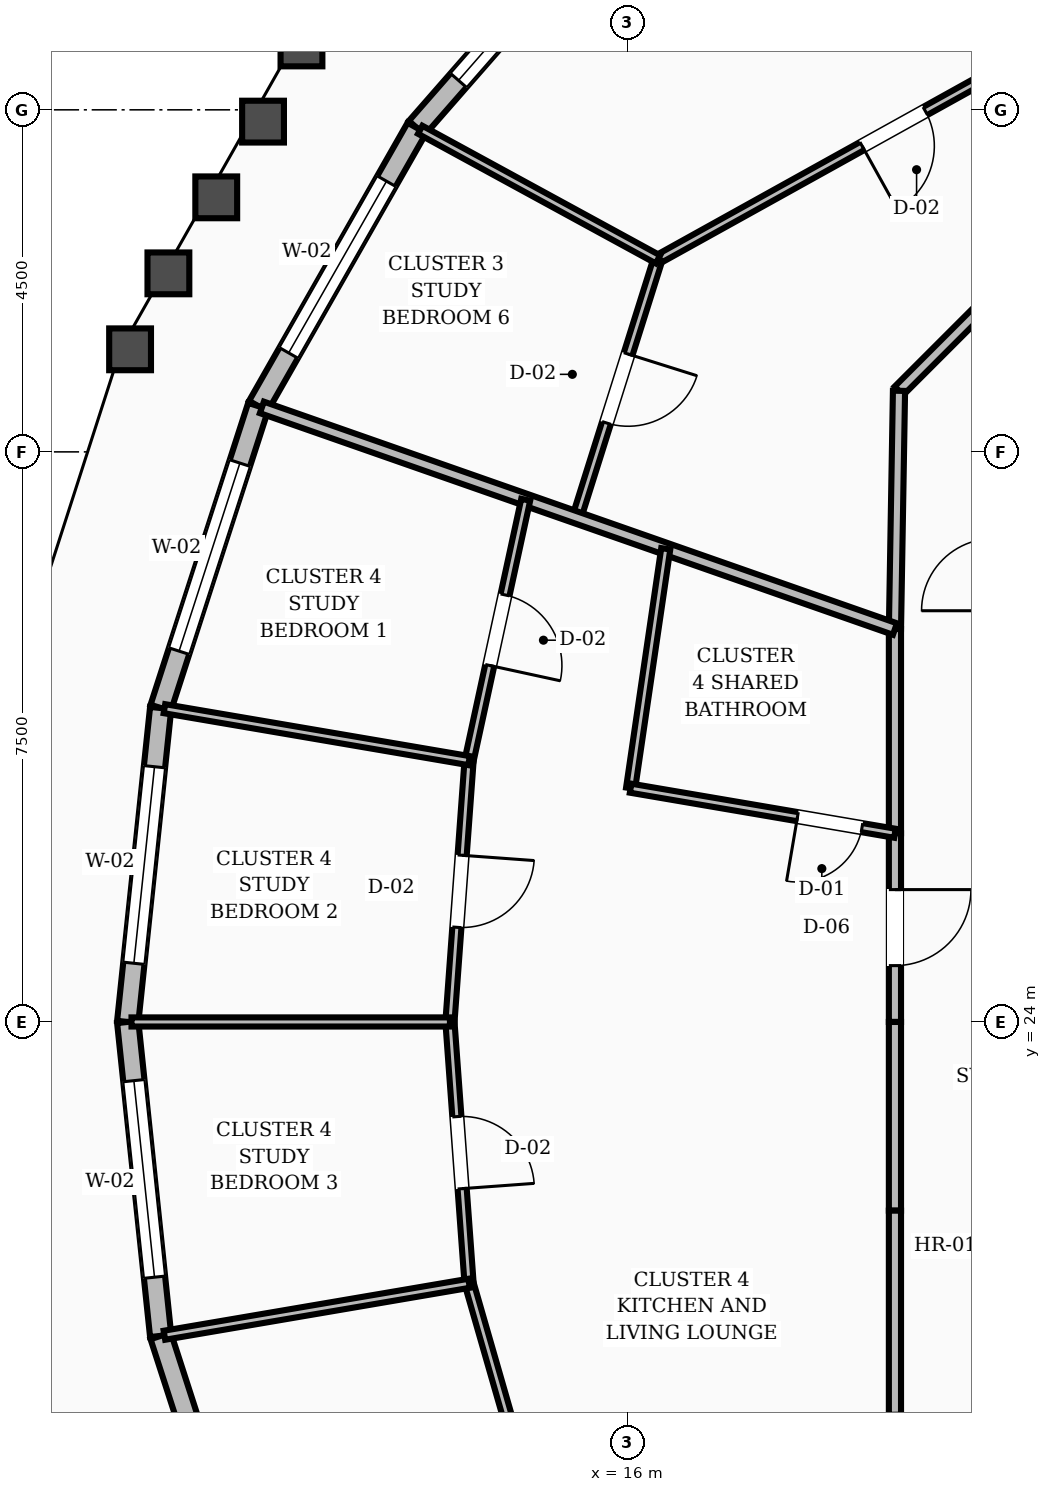
"""IFC4 building model, lengths in metres.
Left out: names, types, materials, properties, quantities, classifications, styles, units other than length and angle.
Written with IfcOpenShell. Run it as: python <this file> out.ifc"""

import sys

from ifc_helpers import new_model, si_unit, direction, frame, frame_2d, origin, place, context, subcontext, project, spatial, rectangle, extrude, element, fill, save


model = new_model("IFC4")
c1 = context("Model", 3, precision=1e-05, world=origin(), true_north=direction((0.0, 1.0)))
c2 = subcontext(c1, "Body", "Model", "MODEL_VIEW")
j1 = project(units=[si_unit("LENGTHUNIT", "METRE"), si_unit("PLANEANGLEUNIT", "RADIAN")], contexts=[c1])
p1 = place(None, origin())
s1 = spatial("IfcSite", under=j1, at=p1, CompositionType="ELEMENT")
p2 = place(p1, origin())
s2 = spatial("IfcBuilding", under=s1, at=p2, CompositionType="ELEMENT")
p3 = place(p2, frame((0.0, 0.0, 229.2)))
s3 = spatial("IfcBuildingStorey", under=s2, at=p3, CompositionType="ELEMENT", Elevation=229.2)
p4 = place(p3, frame((16.038, 38.97, 0.0), z_axis=(0.0, 0.0, 1.0), x_axis=(-0.65855326106, -0.752534120387, 0.0)))
e1 = element("IfcWall", 1, at=p4, inside=s3, PredefinedType="STANDARD", context=c2, shape_type="SweptSolid", body=[
    extrude(rectangle(XDim=4.263, YDim=0.28, at=frame_2d((2.131, 0.0))), origin(), (0.0, 0.0, 1.0), 2.88),
])
p5 = place(p4, frame((0.832, 0.0, 0.8)))
e2 = element("IfcOpeningElement", 2, at=p5, cuts=e1, PredefinedType="OPENING", context=c2, shape_type="SweptSolid", body=[
    extrude(rectangle(XDim=2.6, YDim=1.65, at=frame_2d((1.3, 0.825))), frame((0.0, 0.15, 0.0), z_axis=(0.0, -1.0, 0.0), x_axis=(1.0, 0.0, 0.0)), (0.0, 0.0, 1.0), 0.3),
])
p6 = place(p3, frame((13.23, 35.762, 0.0), z_axis=(0.0, 0.0, 1.0), x_axis=(-0.495183798622, -0.868788239782, 0.0)))
e3 = element("IfcWall", 3, at=p6, inside=s3, PredefinedType="STANDARD", context=c2, shape_type="SweptSolid", body=[
    extrude(rectangle(XDim=4.213, YDim=0.28, at=frame_2d((2.106, 0.0))), origin(), (0.0, 0.0, 1.0), 2.88),
])
p7 = place(p6, frame((0.806, 0.0, 0.8)))
e4 = element("IfcOpeningElement", 4, at=p7, cuts=e3, PredefinedType="OPENING", context=c2, shape_type="SweptSolid", body=[
    extrude(rectangle(XDim=2.6, YDim=1.65, at=frame_2d((1.3, 0.825))), frame((0.0, 0.15, 0.0), z_axis=(0.0, -1.0, 0.0), x_axis=(1.0, 0.0, 0.0)), (0.0, 0.0, 1.0), 0.3),
])
p8 = place(p3, frame((11.144, 32.102, 0.0), z_axis=(0.0, 0.0, 1.0), x_axis=(-0.307722172472, -0.951476255389, 0.0)))
e5 = element("IfcWall", 5, at=p8, inside=s3, PredefinedType="STANDARD", context=c2, shape_type="SweptSolid", body=[
    extrude(rectangle(XDim=4.174, YDim=0.28, at=frame_2d((2.087, 0.0))), origin(), (0.0, 0.0, 1.0), 2.88),
])
p9 = place(p8, frame((0.787, 0.0, 0.8)))
e6 = element("IfcOpeningElement", 6, at=p9, cuts=e5, PredefinedType="OPENING", context=c2, shape_type="SweptSolid", body=[
    extrude(rectangle(XDim=2.6, YDim=1.65, at=frame_2d((1.3, 0.825))), frame((0.0, 0.15, 0.0), z_axis=(0.0, -1.0, 0.0), x_axis=(1.0, 0.0, 0.0)), (0.0, 0.0, 1.0), 0.3),
])
p10 = place(p3, frame((9.86, 28.13, 0.0), z_axis=(0.0, 0.0, 1.0), x_axis=(-0.104467505457, -0.994528300404, 0.0)))
e7 = element("IfcWall", 7, at=p10, inside=s3, PredefinedType="STANDARD", context=c2, shape_type="SweptSolid", body=[
    extrude(rectangle(XDim=4.153, YDim=0.28, at=frame_2d((2.076, 0.0))), origin(), (0.0, 0.0, 1.0), 2.88),
])
p11 = place(p10, frame((0.776, 0.0, 0.8)))
e8 = element("IfcOpeningElement", 8, at=p11, cuts=e7, PredefinedType="OPENING", context=c2, shape_type="SweptSolid", body=[
    extrude(rectangle(XDim=2.6, YDim=1.65, at=frame_2d((1.3, 0.825))), frame((0.0, 0.15, 0.0), z_axis=(0.0, -1.0, 0.0), x_axis=(1.0, 0.0, 0.0)), (0.0, 0.0, 1.0), 0.3),
])
p12 = place(p3, frame((9.426, 24.0, 0.0), z_axis=(0.0, 0.0, 1.0), x_axis=(0.104467505457, -0.994528300404, 0.0)))
e9 = element("IfcWall", 9, at=p12, inside=s3, PredefinedType="STANDARD", context=c2, shape_type="SweptSolid", body=[
    extrude(rectangle(XDim=4.153, YDim=0.28, at=frame_2d((2.076, 0.0))), origin(), (0.0, 0.0, 1.0), 2.88),
])
p13 = place(p12, frame((0.776, 0.0, 0.8)))
e10 = element("IfcOpeningElement", 10, at=p13, cuts=e9, PredefinedType="OPENING", context=c2, shape_type="SweptSolid", body=[
    extrude(rectangle(XDim=2.6, YDim=1.65, at=frame_2d((1.3, 0.825))), frame((0.0, 0.15, 0.0), z_axis=(0.0, -1.0, 0.0), x_axis=(1.0, 0.0, 0.0)), (0.0, 0.0, 1.0), 0.3),
])
p14 = place(p3, frame((9.86, 19.87, 0.0), z_axis=(0.0, 0.0, 1.0), x_axis=(0.307722172472, -0.951476255389, 0.0)))
e11 = element("IfcWall", 11, at=p14, inside=s3, PredefinedType="STANDARD", context=c2, shape_type="SweptSolid", body=[
    extrude(rectangle(XDim=4.174, YDim=0.28, at=frame_2d((2.087, 0.0))), origin(), (0.0, 0.0, 1.0), 2.88),
])
p15 = place(p3, frame((21.635, 34.365, 0.0), z_axis=(0.0, 0.0, 1.0), x_axis=(-0.707106781187, -0.707106781187, 0.0)))
e12 = element("IfcWall", 12, at=p15, inside=s3, PredefinedType="SOLIDWALL", context=c2, shape_type="SweptSolid", body=[
    extrude(rectangle(XDim=2.916, YDim=0.16, at=frame_2d((1.458, 0.0))), origin(), (0.0, 0.0, 1.0), 2.87),
])
p16 = place(p3, frame((19.573, 32.303, 0.0), z_axis=(0.0, 0.0, 1.0), x_axis=(-0.016981035134, -0.999855811828, 0.0)))
e13 = element("IfcWall", 13, at=p16, inside=s3, PredefinedType="SOLIDWALL", context=c2, shape_type="SweptSolid", body=[
    extrude(rectangle(XDim=3.134, YDim=0.16, at=frame_2d((1.567, 0.0))), origin(), (0.0, 0.0, 1.0), 2.87),
])
p17 = place(p3, frame((19.52, 29.169, 0.0), z_axis=(0.0, 0.0, 1.0), x_axis=(0.0, -1.0, 0.0)))
e14 = element("IfcWall", 14, at=p17, inside=s3, PredefinedType="SOLIDWALL", context=c2, shape_type="SweptSolid", body=[
    extrude(rectangle(XDim=2.687, YDim=0.16, at=frame_2d((1.344, 0.0))), origin(), (0.0, 0.0, 1.0), 2.87),
])
p18 = place(p3, frame((19.52, 26.482, 0.0), z_axis=(0.0, 0.0, 1.0), x_axis=(0.0, -1.0, 0.0)))
e15 = element("IfcWall", 15, at=p18, inside=s3, PredefinedType="SOLIDWALL", context=c2, shape_type="SweptSolid", body=[
    extrude(rectangle(XDim=2.482, YDim=0.16, at=frame_2d((1.241, 0.0))), origin(), (0.0, 0.0, 1.0), 2.87),
])
p19 = place(p18, frame((0.741, 0.0, 0.0)))
e16 = element("IfcOpeningElement", 16, at=p19, cuts=e15, PredefinedType="OPENING", context=c2, shape_type="SweptSolid", body=[
    extrude(rectangle(XDim=1.0, YDim=2.1, at=frame_2d((0.5, 1.05))), frame((0.0, 0.09, 0.0), z_axis=(0.0, -1.0, 0.0), x_axis=(1.0, 0.0, 0.0)), (0.0, 0.0, 1.0), 0.18),
])
p20 = place(p3, frame((19.52, 24.0, 0.0), z_axis=(0.0, 0.0, 1.0), x_axis=(0.0, -1.0, 0.0)))
e17 = element("IfcWall", 17, at=p20, inside=s3, PredefinedType="SOLIDWALL", context=c2, shape_type="SweptSolid", body=[
    extrude(rectangle(XDim=2.482, YDim=0.16, at=frame_2d((1.241, 0.0))), origin(), (0.0, 0.0, 1.0), 2.87),
])
p21 = place(p3, frame((19.52, 21.518, 0.0), z_axis=(0.0, 0.0, 1.0), x_axis=(0.0, -1.0, 0.0)))
e18 = element("IfcWall", 18, at=p21, inside=s3, PredefinedType="SOLIDWALL", context=c2, shape_type="SweptSolid", body=[
    extrude(rectangle(XDim=2.687, YDim=0.16, at=frame_2d((1.344, 0.0))), origin(), (0.0, 0.0, 1.0), 2.87),
])
p22 = place(p3, frame((22.606, 37.476, 0.0), z_axis=(0.0, 0.0, 1.0), x_axis=(-0.87432114738, -0.485347845616, 0.0)))
e19 = element("IfcWall", 19, at=p22, inside=s3, PredefinedType="PARTITIONING", context=c2, shape_type="SweptSolid", body=[
    extrude(rectangle(XDim=7.096, YDim=0.12, at=frame_2d((3.548, 0.0))), origin(), (0.0, 0.0, 1.0), 2.87),
])
p23 = place(p22, frame((3.073, 0.0, 0.0)))
e20 = element("IfcOpeningElement", 20, at=p23, cuts=e19, PredefinedType="OPENING", context=c2, shape_type="SweptSolid", body=[
    extrude(rectangle(XDim=0.95, YDim=2.1, at=frame_2d((0.475, 1.05))), frame((0.0, 0.07, 0.0), z_axis=(0.0, -1.0, 0.0), x_axis=(1.0, 0.0, 0.0)), (0.0, 0.0, 1.0), 0.14),
])
p24 = place(p3, frame((16.402, 34.032, 0.0), z_axis=(0.0, 0.0, 1.0), x_axis=(-0.300389822632, -0.953816520333, 0.0)))
e21 = element("IfcWall", 21, at=p24, inside=s3, PredefinedType="PARTITIONING", context=c2, shape_type="SweptSolid", body=[
    extrude(rectangle(XDim=3.562, YDim=0.12, at=frame_2d((1.781, 0.0))), origin(), (0.0, 0.0, 1.0), 2.87),
])
p25 = place(p24, frame((1.306, 0.0, 0.0)))
e22 = element("IfcOpeningElement", 22, at=p25, cuts=e21, PredefinedType="OPENING", context=c2, shape_type="SweptSolid", body=[
    extrude(rectangle(XDim=0.95, YDim=2.1, at=frame_2d((0.475, 1.05))), frame((0.0, 0.07, 0.0), z_axis=(0.0, -1.0, 0.0), x_axis=(1.0, 0.0, 0.0)), (0.0, 0.0, 1.0), 0.14),
])
p26 = place(p3, frame((16.402, 34.032, 0.0), z_axis=(0.0, 0.0, 1.0), x_axis=(-0.877961046071, 0.478732077034, 0.0)))
e23 = element("IfcWall", 23, at=p26, inside=s3, PredefinedType="PARTITIONING", context=c2, shape_type="SweptSolid", body=[
    extrude(rectangle(XDim=3.562, YDim=0.12, at=frame_2d((1.781, 0.0))), origin(), (0.0, 0.0, 1.0), 2.87),
])
p27 = place(p3, frame((19.52, 29.169, 0.0), z_axis=(0.0, 0.0, 1.0), x_axis=(-0.943840238758, 0.33040218477, 0.0)))
e24 = element("IfcWall", 24, at=p27, inside=s3, PredefinedType="SOLIDWALL", context=c2, shape_type="SweptSolid", body=[
    extrude(rectangle(XDim=8.824, YDim=0.16, at=frame_2d((4.412, 0.0))), origin(), (0.0, 0.0, 1.0), 2.87),
])
p28 = place(p3, frame((16.505, 30.225, 0.0), z_axis=(0.0, 0.0, 1.0), x_axis=(-0.145264349806, -0.989392878828, 0.0)))
e25 = element("IfcWall", 25, at=p28, inside=s3, PredefinedType="PARTITIONING", context=c2, shape_type="SweptSolid", body=[
    extrude(rectangle(XDim=3.183, YDim=0.12, at=frame_2d((1.592, 0.0))), origin(), (0.0, 0.0, 1.0), 2.87),
])
p29 = place(p3, frame((19.52, 26.482, 0.0), z_axis=(0.0, 0.0, 1.0), x_axis=(-0.985760215804, 0.16815706033, 0.0)))
e26 = element("IfcWall", 26, at=p29, inside=s3, PredefinedType="PARTITIONING", context=c2, shape_type="SweptSolid", body=[
    extrude(rectangle(XDim=3.528, YDim=0.12, at=frame_2d((1.764, 0.0))), origin(), (0.0, 0.0, 1.0), 2.87),
])
p30 = place(p29, frame((0.44, 0.0, 0.0)))
e27 = element("IfcOpeningElement", 27, at=p30, cuts=e26, PredefinedType="OPENING", context=c2, shape_type="SweptSolid", body=[
    extrude(rectangle(XDim=0.86, YDim=2.1, at=frame_2d((0.43, 1.05))), frame((0.0, 0.07, 0.0), z_axis=(0.0, -1.0, 0.0), x_axis=(1.0, 0.0, 0.0)), (0.0, 0.0, 1.0), 0.14),
])
p31 = place(p3, frame((14.662, 30.87, 0.0), z_axis=(0.0, 0.0, 1.0), x_axis=(-0.212158353799, -0.977235300689, 0.0)))
e28 = element("IfcWall", 28, at=p31, inside=s3, PredefinedType="PARTITIONING", context=c2, shape_type="SweptSolid", body=[
    extrude(rectangle(XDim=3.512, YDim=0.12, at=frame_2d((1.756, 0.0))), origin(), (0.0, 0.0, 1.0), 2.87),
])
p32 = place(p31, frame((1.281, 0.0, 0.0)))
e29 = element("IfcOpeningElement", 29, at=p32, cuts=e28, PredefinedType="OPENING", context=c2, shape_type="SweptSolid", body=[
    extrude(rectangle(XDim=0.95, YDim=2.1, at=frame_2d((0.475, 1.05))), frame((0.0, 0.07, 0.0), z_axis=(0.0, -1.0, 0.0), x_axis=(1.0, 0.0, 0.0)), (0.0, 0.0, 1.0), 0.14),
])
p33 = place(p3, frame((13.917, 27.438, 0.0), z_axis=(0.0, 0.0, 1.0), x_axis=(-0.072948147054, -0.997335734766, 0.0)))
e30 = element("IfcWall", 30, at=p33, inside=s3, PredefinedType="PARTITIONING", context=c2, shape_type="SweptSolid", body=[
    extrude(rectangle(XDim=3.447, YDim=0.12, at=frame_2d((1.724, 0.0))), origin(), (0.0, 0.0, 1.0), 2.87),
])
p34 = place(p33, frame((1.249, 0.0, 0.0)))
e31 = element("IfcOpeningElement", 31, at=p34, cuts=e30, PredefinedType="OPENING", context=c2, shape_type="SweptSolid", body=[
    extrude(rectangle(XDim=0.95, YDim=2.1, at=frame_2d((0.475, 1.05))), frame((0.0, 0.07, 0.0), z_axis=(0.0, -1.0, 0.0), x_axis=(1.0, 0.0, 0.0)), (0.0, 0.0, 1.0), 0.14),
])
p35 = place(p3, frame((13.917, 27.438, 0.0), z_axis=(0.0, 0.0, 1.0), x_axis=(-0.98576362556, 0.168137070637, 0.0)))
e32 = element("IfcWall", 32, at=p35, inside=s3, PredefinedType="PARTITIONING", context=c2, shape_type="SweptSolid", body=[
    extrude(rectangle(XDim=4.066, YDim=0.12, at=frame_2d((2.033, 0.0))), origin(), (0.0, 0.0, 1.0), 2.87),
])
p36 = place(p3, frame((13.666, 24.0, 0.0), z_axis=(0.0, 0.0, 1.0), x_axis=(0.072948147054, -0.997335734766, 0.0)))
e33 = element("IfcWall", 33, at=p36, inside=s3, PredefinedType="PARTITIONING", context=c2, shape_type="SweptSolid", body=[
    extrude(rectangle(XDim=3.447, YDim=0.12, at=frame_2d((1.724, 0.0))), origin(), (0.0, 0.0, 1.0), 2.87),
])
p37 = place(p36, frame((1.249, 0.0, 0.0)))
e34 = element("IfcOpeningElement", 34, at=p37, cuts=e33, PredefinedType="OPENING", context=c2, shape_type="SweptSolid", body=[
    extrude(rectangle(XDim=0.95, YDim=2.1, at=frame_2d((0.475, 1.05))), frame((0.0, 0.07, 0.0), z_axis=(0.0, -1.0, 0.0), x_axis=(1.0, 0.0, 0.0)), (0.0, 0.0, 1.0), 0.14),
])
p38 = place(p3, frame((13.666, 24.0, 0.0), z_axis=(0.0, 0.0, 1.0), x_axis=(-1.0, 0.0, 0.0)))
e35 = element("IfcWall", 35, at=p38, inside=s3, PredefinedType="PARTITIONING", context=c2, shape_type="SweptSolid", body=[
    extrude(rectangle(XDim=4.189, YDim=0.12, at=frame_2d((2.095, 0.0))), origin(), (0.0, 0.0, 1.0), 2.87),
])
p39 = place(p3, frame((13.917, 20.562, 0.0), z_axis=(0.0, 0.0, 1.0), x_axis=(0.276547112257, -0.961000361448, 0.0)))
e36 = element("IfcWall", 36, at=p39, inside=s3, PredefinedType="PARTITIONING", context=c2, shape_type="SweptSolid", body=[
    extrude(rectangle(XDim=7.15, YDim=0.12, at=frame_2d((3.575, 0.0))), origin(), (0.0, 0.0, 1.0), 2.87),
])
p40 = place(p39, frame((3.1, 0.0, 0.0)))
e37 = element("IfcOpeningElement", 37, at=p40, cuts=e36, PredefinedType="OPENING", context=c2, shape_type="SweptSolid", body=[
    extrude(rectangle(XDim=0.95, YDim=2.1, at=frame_2d((0.475, 1.05))), frame((0.0, 0.07, 0.0), z_axis=(0.0, -1.0, 0.0), x_axis=(1.0, 0.0, 0.0)), (0.0, 0.0, 1.0), 0.14),
])
p41 = place(p3, frame((13.917, 20.562, 0.0), z_axis=(0.0, 0.0, 1.0), x_axis=(-0.98576362556, -0.168137070637, 0.0)))
e38 = element("IfcWall", 38, at=p41, inside=s3, PredefinedType="PARTITIONING", context=c2, shape_type="SweptSolid", body=[
    extrude(rectangle(XDim=4.066, YDim=0.12, at=frame_2d((2.033, 0.0))), origin(), (0.0, 0.0, 1.0), 2.87),
])
p42 = place(p5, origin())
e39 = element("IfcWindow", 39, at=p42, inside=s3, PartitioningType="SINGLE_PANEL", PredefinedType="WINDOW", context=c2, shape_type="SweptSolid", body=[
    extrude(rectangle(XDim=2.6, YDim=1.65, at=frame_2d((1.3, 0.825))), frame((0.0, 0.03, 0.0), z_axis=(0.0, -1.0, 0.0), x_axis=(1.0, 0.0, 0.0)), (0.0, 0.0, 1.0), 0.06),
])
fill(e2, e39)
p43 = place(p7, origin())
e40 = element("IfcWindow", 40, at=p43, inside=s3, PartitioningType="SINGLE_PANEL", PredefinedType="WINDOW", context=c2, shape_type="SweptSolid", body=[
    extrude(rectangle(XDim=2.6, YDim=1.65, at=frame_2d((1.3, 0.825))), frame((0.0, 0.03, 0.0), z_axis=(0.0, -1.0, 0.0), x_axis=(1.0, 0.0, 0.0)), (0.0, 0.0, 1.0), 0.06),
])
fill(e4, e40)
p44 = place(p9, origin())
e41 = element("IfcWindow", 41, at=p44, inside=s3, PartitioningType="SINGLE_PANEL", PredefinedType="WINDOW", context=c2, shape_type="SweptSolid", body=[
    extrude(rectangle(XDim=2.6, YDim=1.65, at=frame_2d((1.3, 0.825))), frame((0.0, 0.03, 0.0), z_axis=(0.0, -1.0, 0.0), x_axis=(1.0, 0.0, 0.0)), (0.0, 0.0, 1.0), 0.06),
])
fill(e6, e41)
p45 = place(p11, origin())
e42 = element("IfcWindow", 42, at=p45, inside=s3, PartitioningType="SINGLE_PANEL", PredefinedType="WINDOW", context=c2, shape_type="SweptSolid", body=[
    extrude(rectangle(XDim=2.6, YDim=1.65, at=frame_2d((1.3, 0.825))), frame((0.0, 0.03, 0.0), z_axis=(0.0, -1.0, 0.0), x_axis=(1.0, 0.0, 0.0)), (0.0, 0.0, 1.0), 0.06),
])
fill(e8, e42)
p46 = place(p13, origin())
e43 = element("IfcWindow", 43, at=p46, inside=s3, PartitioningType="SINGLE_PANEL", PredefinedType="WINDOW", context=c2, shape_type="SweptSolid", body=[
    extrude(rectangle(XDim=2.6, YDim=1.65, at=frame_2d((1.3, 0.825))), frame((0.0, 0.03, 0.0), z_axis=(0.0, -1.0, 0.0), x_axis=(1.0, 0.0, 0.0)), (0.0, 0.0, 1.0), 0.06),
])
fill(e10, e43)
p47 = place(p23, origin())
e44 = element("IfcDoor", 44, at=p47, inside=s3, OperationType="SINGLE_SWING_RIGHT", PredefinedType="DOOR", context=c2, shape_type="SweptSolid", body=[
    extrude(rectangle(XDim=0.95, YDim=2.1, at=frame_2d((0.475, 1.05))), frame((0.0, 0.025, 0.0), z_axis=(0.0, -1.0, 0.0), x_axis=(1.0, 0.0, 0.0)), (0.0, 0.0, 1.0), 0.05),
])
fill(e20, e44)
p48 = place(p25, origin())
e45 = element("IfcDoor", 45, at=p48, inside=s3, OperationType="SINGLE_SWING_LEFT", PredefinedType="DOOR", context=c2, shape_type="SweptSolid", body=[
    extrude(rectangle(XDim=0.95, YDim=2.1, at=frame_2d((0.475, 1.05))), frame((0.0, 0.025, 0.0), z_axis=(0.0, -1.0, 0.0), x_axis=(1.0, 0.0, 0.0)), (0.0, 0.0, 1.0), 0.05),
])
fill(e22, e45)
p49 = place(p30, origin())
e46 = element("IfcDoor", 46, at=p49, inside=s3, OperationType="SINGLE_SWING_RIGHT", PredefinedType="DOOR", context=c2, shape_type="SweptSolid", body=[
    extrude(rectangle(XDim=0.86, YDim=2.1, at=frame_2d((0.43, 1.05))), frame((0.0, 0.025, 0.0), z_axis=(0.0, -1.0, 0.0), x_axis=(1.0, 0.0, 0.0)), (0.0, 0.0, 1.0), 0.05),
])
fill(e27, e46)
p50 = place(p19, origin())
e47 = element("IfcDoor", 47, at=p50, inside=s3, OperationType="SINGLE_SWING_LEFT", PredefinedType="DOOR", context=c2, shape_type="SweptSolid", body=[
    extrude(rectangle(XDim=1.0, YDim=2.1, at=frame_2d((0.5, 1.05))), frame((0.0, 0.025, 0.0), z_axis=(0.0, -1.0, 0.0), x_axis=(1.0, 0.0, 0.0)), (0.0, 0.0, 1.0), 0.05),
])
fill(e16, e47)
p51 = place(p32, origin())
e48 = element("IfcDoor", 48, at=p51, inside=s3, OperationType="SINGLE_SWING_RIGHT", PredefinedType="DOOR", context=c2, shape_type="SweptSolid", body=[
    extrude(rectangle(XDim=0.95, YDim=2.1, at=frame_2d((0.475, 1.05))), frame((0.0, 0.025, 0.0), z_axis=(0.0, -1.0, 0.0), x_axis=(1.0, 0.0, 0.0)), (0.0, 0.0, 1.0), 0.05),
])
fill(e29, e48)
p52 = place(p34, origin())
e49 = element("IfcDoor", 49, at=p52, inside=s3, OperationType="SINGLE_SWING_LEFT", PredefinedType="DOOR", context=c2, shape_type="SweptSolid", body=[
    extrude(rectangle(XDim=0.95, YDim=2.1, at=frame_2d((0.475, 1.05))), frame((0.0, 0.025, 0.0), z_axis=(0.0, -1.0, 0.0), x_axis=(1.0, 0.0, 0.0)), (0.0, 0.0, 1.0), 0.05),
])
fill(e31, e49)
p53 = place(p37, origin())
e50 = element("IfcDoor", 50, at=p53, inside=s3, OperationType="SINGLE_SWING_RIGHT", PredefinedType="DOOR", context=c2, shape_type="SweptSolid", body=[
    extrude(rectangle(XDim=0.95, YDim=2.1, at=frame_2d((0.475, 1.05))), frame((0.0, 0.025, 0.0), z_axis=(0.0, -1.0, 0.0), x_axis=(1.0, 0.0, 0.0)), (0.0, 0.0, 1.0), 0.05),
])
fill(e34, e50)
save(model, sys.argv[1])
